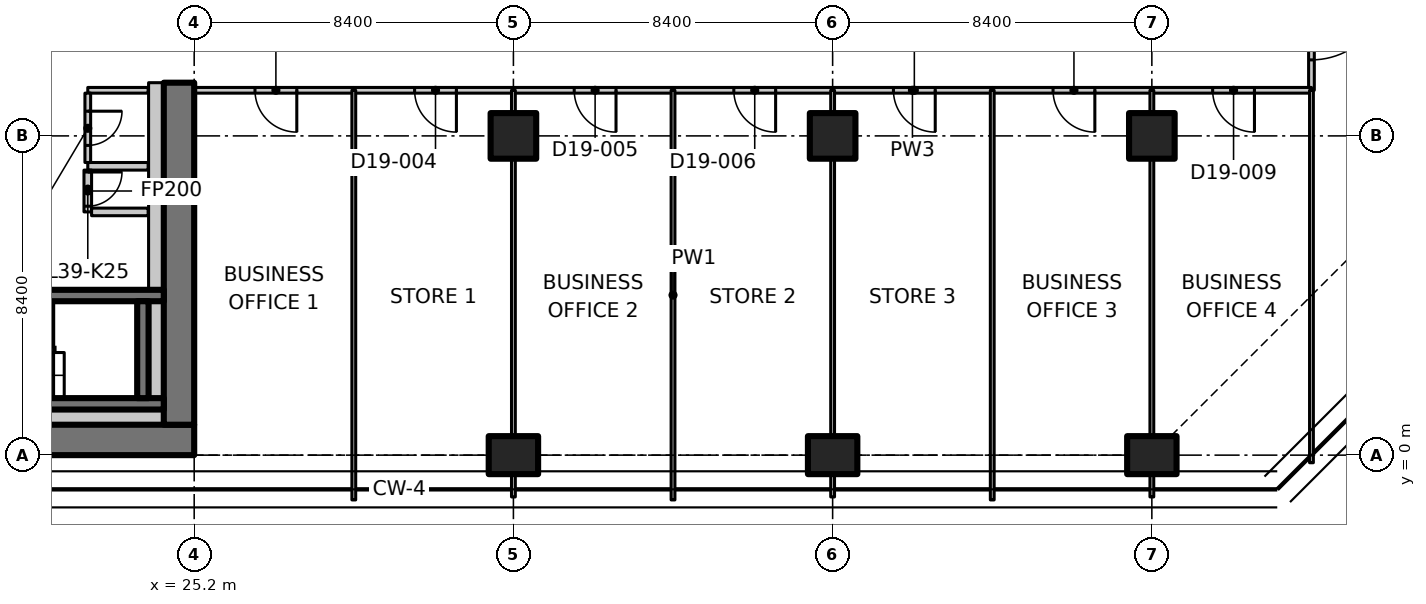
"""IFC4 building model, lengths in metres.
Left out: names, types, materials, properties, quantities, classifications, styles, units other than length and angle.
Written with IfcOpenShell. Run it as: python <this file> out.ifc"""

import sys

from ifc_helpers import new_model, si_unit, direction, frame, frame_2d, origin, origin_2d, place, context, subcontext, project, spatial, polyline, rectangle, outline, extrude, element, fill, save


model = new_model("IFC4")
c1 = context("Model", 3, precision=1e-05, world=origin(), true_north=direction((0.0, 1.0)))
c2 = subcontext(c1, "Body", "Model", "MODEL_VIEW")
j1 = project(units=[si_unit("LENGTHUNIT", "METRE"), si_unit("PLANEANGLEUNIT", "RADIAN")], contexts=[c1])
p1 = place(None, origin())
s1 = spatial("IfcSite", under=j1, at=p1, CompositionType="ELEMENT")
p2 = place(p1, origin())
s2 = spatial("IfcBuilding", under=s1, at=p2, CompositionType="ELEMENT")
p3 = place(p2, frame((0.0, 0.0, 156.5)))
s3 = spatial("IfcBuildingStorey", under=s2, at=p3, CompositionType="ELEMENT", Elevation=156.5)
p4 = place(p3, frame((33.6, 0.0, 0.0), z_axis=(0.0, 0.0, 1.0), x_axis=(0.0, 1.0, 0.0)))
e1 = element("IfcColumn", 1, at=p4, inside=s3, PredefinedType="COLUMN", context=c2, shape_type="SweptSolid", body=[
    extrude(rectangle(XDim=1.0, YDim=1.3, at=origin_2d()), origin(), (0.0, 0.0, 1.0), 5.2),
])
p5 = place(p3, frame((33.6, 8.4, 0.0), z_axis=(0.0, 0.0, 1.0), x_axis=(1.0, 0.0, 0.0)))
e2 = element("IfcColumn", 2, at=p5, inside=s3, PredefinedType="COLUMN", context=c2, shape_type="SweptSolid", body=[
    extrude(rectangle(XDim=1.2, YDim=1.2, at=origin_2d()), origin(), (0.0, 0.0, 1.0), 5.2),
])
p6 = place(p3, frame((42.0, 0.0, 0.0), z_axis=(0.0, 0.0, 1.0), x_axis=(0.0, 1.0, 0.0)))
e3 = element("IfcColumn", 3, at=p6, inside=s3, PredefinedType="COLUMN", context=c2, shape_type="SweptSolid", body=[
    extrude(rectangle(XDim=1.0, YDim=1.3, at=origin_2d()), origin(), (0.0, 0.0, 1.0), 5.2),
])
p7 = place(p3, frame((42.0, 8.4, 0.0), z_axis=(0.0, 0.0, 1.0), x_axis=(1.0, 0.0, 0.0)))
e4 = element("IfcColumn", 4, at=p7, inside=s3, PredefinedType="COLUMN", context=c2, shape_type="SweptSolid", body=[
    extrude(rectangle(XDim=1.2, YDim=1.2, at=origin_2d()), origin(), (0.0, 0.0, 1.0), 5.2),
])
p8 = place(p3, frame((50.4, 0.0, 0.0), z_axis=(0.0, 0.0, 1.0), x_axis=(0.0, 1.0, 0.0)))
e5 = element("IfcColumn", 5, at=p8, inside=s3, PredefinedType="COLUMN", context=c2, shape_type="SweptSolid", body=[
    extrude(rectangle(XDim=1.0, YDim=1.3, at=origin_2d()), origin(), (0.0, 0.0, 1.0), 5.2),
])
p9 = place(p3, frame((50.4, 8.4, 0.0), z_axis=(0.0, 0.0, 1.0), x_axis=(1.0, 0.0, 0.0)))
e6 = element("IfcColumn", 6, at=p9, inside=s3, PredefinedType="COLUMN", context=c2, shape_type="SweptSolid", body=[
    extrude(rectangle(XDim=1.2, YDim=1.2, at=origin_2d()), origin(), (0.0, 0.0, 1.0), 5.2),
])
p10 = place(p3, frame((7.136, 0.4, 0.0), z_axis=(0.0, 0.0, 1.0), x_axis=(1.0, 0.0, 0.0)))
e7 = element("IfcWall", 7, at=p10, inside=s3, PredefinedType="SHEAR", context=c2, shape_type="SweptSolid", body=[
    extrude(rectangle(XDim=18.063, YDim=0.8, at=frame_2d((9.032, 0.0))), origin(), (0.0, 0.0, 1.0), 5.2),
])
p11 = place(p3, frame((24.8, 0.8, 0.0), z_axis=(0.0, 0.0, 1.0), x_axis=(0.0, 1.0, 0.0)))
e8 = element("IfcWall", 8, at=p11, inside=s3, PredefinedType="SHEAR", context=c2, shape_type="SweptSolid", body=[
    extrude(rectangle(XDim=9.0, YDim=0.8, at=frame_2d((4.5, 0.0))), origin(), (0.0, 0.0, 1.0), 5.2),
])
p12 = place(p3, frame((15.8, 1.35, 0.0), z_axis=(0.0, 0.0, 1.0), x_axis=(1.0, 0.0, 0.0)))
e9 = element("IfcWall", 9, at=p12, inside=s3, PredefinedType="SHEAR", context=c2, shape_type="SweptSolid", body=[
    extrude(rectangle(XDim=8.6, YDim=0.3, at=frame_2d((4.3, 0.0))), origin(), (0.0, 0.0, 1.0), 5.2),
])
p13 = place(p3, frame((15.8, 4.2, 0.0), z_axis=(0.0, 0.0, 1.0), x_axis=(1.0, 0.0, 0.0)))
e10 = element("IfcWall", 10, at=p13, inside=s3, PredefinedType="SHEAR", context=c2, shape_type="SweptSolid", body=[
    extrude(rectangle(XDim=8.6, YDim=0.3, at=frame_2d((4.3, 0.0))), origin(), (0.0, 0.0, 1.0), 5.2),
])
p14 = place(p13, frame((0.4, 0.0, 0.0)))
e11 = element("IfcOpeningElement", 11, at=p14, cuts=e10, PredefinedType="OPENING", context=c2, shape_type="SweptSolid", body=[
    extrude(rectangle(XDim=1.0, YDim=2.1, at=frame_2d((0.5, 1.05))), frame((0.0, 0.16, 0.0), z_axis=(0.0, -1.0, 0.0), x_axis=(1.0, 0.0, 0.0)), (0.0, 0.0, 1.0), 0.32),
])
p15 = place(p3, frame((23.85, 1.5, 0.0), z_axis=(0.0, 0.0, 1.0), x_axis=(0.0, 1.0, 0.0)))
e12 = element("IfcWall", 12, at=p15, inside=s3, PredefinedType="SHEAR", context=c2, shape_type="SweptSolid", body=[
    extrude(rectangle(XDim=2.55, YDim=0.3, at=frame_2d((1.275, 0.0))), origin(), (0.0, 0.0, 1.0), 5.2),
])
p16 = place(p3, frame((23.988, 7.6, 0.0), z_axis=(0.0, 0.0, 1.0), x_axis=(-1.0, 0.0, 0.0)))
e13 = element("IfcWall", 13, at=p16, inside=s3, PredefinedType="PARTITIONING", context=c2, shape_type="SweptSolid", body=[
    extrude(rectangle(XDim=1.588, YDim=0.2, at=frame_2d((0.794, 0.0))), origin(), (0.0, 0.0, 1.0), 5.2),
])
p17 = place(p3, frame((22.4, 7.5, 0.0), z_axis=(0.0, 0.0, 1.0), x_axis=(0.0, -1.0, 0.0)))
e14 = element("IfcWall", 14, at=p17, inside=s3, PredefinedType="PARTITIONING", context=c2, shape_type="SweptSolid", body=[
    extrude(rectangle(XDim=1.1, YDim=0.2, at=frame_2d((0.55, 0.0))), origin(), (0.0, 0.0, 1.0), 5.2),
])
p18 = place(p17, frame((0.05, 0.0, 0.0)))
e15 = element("IfcOpeningElement", 15, at=p18, cuts=e14, PredefinedType="OPENING", context=c2, shape_type="SweptSolid", body=[
    extrude(rectangle(XDim=0.9, YDim=2.1, at=frame_2d((0.45, 1.05))), frame((0.0, 0.11, 0.0), z_axis=(0.0, -1.0, 0.0), x_axis=(1.0, 0.0, 0.0)), (0.0, 0.0, 1.0), 0.22),
])
p19 = place(p3, frame((22.5, 6.4, 0.0), z_axis=(0.0, 0.0, 1.0), x_axis=(1.0, 0.0, 0.0)))
e16 = element("IfcWall", 16, at=p19, inside=s3, PredefinedType="PARTITIONING", context=c2, shape_type="SweptSolid", body=[
    extrude(rectangle(XDim=1.488, YDim=0.2, at=frame_2d((0.744, 0.0))), origin(), (0.0, 0.0, 1.0), 5.2),
])
p20 = place(p3, frame((23.988, 9.6, 0.0), z_axis=(0.0, 0.0, 1.0), x_axis=(-1.0, 0.0, 0.0)))
e17 = element("IfcWall", 17, at=p20, inside=s3, PredefinedType="PARTITIONING", context=c2, shape_type="SweptSolid", body=[
    extrude(rectangle(XDim=1.588, YDim=0.15, at=frame_2d((0.794, 0.0))), origin(), (0.0, 0.0, 1.0), 5.2),
])
p21 = place(p3, frame((22.4, 9.525, 0.0), z_axis=(0.0, 0.0, 1.0), x_axis=(0.0, -1.0, 0.0)))
e18 = element("IfcWall", 18, at=p21, inside=s3, PredefinedType="PARTITIONING", context=c2, shape_type="SweptSolid", body=[
    extrude(rectangle(XDim=1.825, YDim=0.15, at=frame_2d((0.913, 0.0))), origin(), (0.0, 0.0, 1.0), 5.2),
])
p22 = place(p21, frame((0.475, 0.0, 0.0)))
e19 = element("IfcOpeningElement", 19, at=p22, cuts=e18, PredefinedType="OPENING", context=c2, shape_type="SweptSolid", body=[
    extrude(rectangle(XDim=0.9, YDim=2.1, at=frame_2d((0.45, 1.05))), frame((0.0, 0.085, 0.0), z_axis=(0.0, -1.0, 0.0), x_axis=(1.0, 0.0, 0.0)), (0.0, 0.0, 1.0), 0.17),
])
p23 = place(p3, frame((13.35, 1.0, 0.0), z_axis=(0.0, 0.0, 1.0), x_axis=(1.0, 0.0, 0.0)))
e20 = element("IfcWall", 20, at=p23, inside=s3, PredefinedType="PARTITIONING", context=c2, shape_type="SweptSolid", body=[
    extrude(rectangle(XDim=11.05, YDim=0.4, at=frame_2d((5.525, 0.0))), origin(), (0.0, 0.0, 1.0), 5.2),
])
p24 = place(p3, frame((24.2, 1.5, 0.0), z_axis=(0.0, 0.0, 1.0), x_axis=(0.0, 1.0, 0.0)))
e21 = element("IfcWall", 21, at=p24, inside=s3, PredefinedType="PARTITIONING", context=c2, shape_type="SweptSolid", body=[
    extrude(rectangle(XDim=2.55, YDim=0.4, at=frame_2d((1.275, 0.0))), origin(), (0.0, 0.0, 1.0), 5.2),
])
p25 = place(p3, frame((24.2, 4.35, 0.0), z_axis=(0.0, 0.0, 1.0), x_axis=(0.0, 1.0, 0.0)))
e22 = element("IfcWall", 22, at=p25, inside=s3, PredefinedType="PARTITIONING", context=c2, shape_type="SweptSolid", body=[
    extrude(rectangle(XDim=5.45, YDim=0.4, at=frame_2d((2.725, 0.0))), origin(), (0.0, 0.0, 1.0), 5.2),
])
p26 = place(p3, frame((29.4, 9.6, 0.0), z_axis=(0.0, 0.0, 1.0), x_axis=(-1.0, 0.0, 0.0)))
e23 = element("IfcWall", 23, at=p26, inside=s3, PredefinedType="PARTITIONING", context=c2, shape_type="SweptSolid", body=[
    extrude(rectangle(XDim=4.2, YDim=0.15, at=frame_2d((2.1, 0.0))), origin(), (0.0, 0.0, 1.0), 5.18),
])
p27 = place(p26, frame((1.5, 0.0, 0.0)))
e24 = element("IfcOpeningElement", 24, at=p27, cuts=e23, PredefinedType="OPENING", context=c2, shape_type="SweptSolid", body=[
    extrude(rectangle(XDim=1.1, YDim=2.1, at=frame_2d((0.55, 1.05))), frame((0.0, 0.085, 0.0), z_axis=(0.0, -1.0, 0.0), x_axis=(1.0, 0.0, 0.0)), (0.0, 0.0, 1.0), 0.17),
])
p28 = place(p3, frame((54.6, 13.0, 0.0), z_axis=(0.0, 0.0, 1.0), x_axis=(0.0, -1.0, 0.0)))
e25 = element("IfcWall", 25, at=p28, inside=s3, PredefinedType="PARTITIONING", context=c2, shape_type="SweptSolid", body=[
    extrude(rectangle(XDim=3.4, YDim=0.15, at=frame_2d((1.7, 0.0))), origin(), (0.0, 0.0, 1.0), 5.18),
])
p29 = place(p28, frame((0.6, 0.0, 0.0)))
e26 = element("IfcOpeningElement", 26, at=p29, cuts=e25, PredefinedType="OPENING", context=c2, shape_type="SweptSolid", body=[
    extrude(rectangle(XDim=2.0, YDim=2.4, at=frame_2d((1.0, 1.2))), frame((0.0, 0.085, 0.0), z_axis=(0.0, -1.0, 0.0), x_axis=(1.0, 0.0, 0.0)), (0.0, 0.0, 1.0), 0.17),
])
p30 = place(p3, frame((33.6, 9.6, 0.0), z_axis=(0.0, 0.0, 1.0), x_axis=(-1.0, 0.0, 0.0)))
e27 = element("IfcWall", 27, at=p30, inside=s3, PredefinedType="PARTITIONING", context=c2, shape_type="SweptSolid", body=[
    extrude(rectangle(XDim=4.2, YDim=0.15, at=frame_2d((2.1, 0.0))), origin(), (0.0, 0.0, 1.0), 5.18),
])
p31 = place(p30, frame((1.5, 0.0, 0.0)))
e28 = element("IfcOpeningElement", 28, at=p31, cuts=e27, PredefinedType="OPENING", context=c2, shape_type="SweptSolid", body=[
    extrude(rectangle(XDim=1.1, YDim=2.1, at=frame_2d((0.55, 1.05))), frame((0.0, 0.085, 0.0), z_axis=(0.0, -1.0, 0.0), x_axis=(1.0, 0.0, 0.0)), (0.0, 0.0, 1.0), 0.17),
])
p32 = place(p3, frame((37.8, 9.6, 0.0), z_axis=(0.0, 0.0, 1.0), x_axis=(-1.0, 0.0, 0.0)))
e29 = element("IfcWall", 29, at=p32, inside=s3, PredefinedType="PARTITIONING", context=c2, shape_type="SweptSolid", body=[
    extrude(rectangle(XDim=4.2, YDim=0.15, at=frame_2d((2.1, 0.0))), origin(), (0.0, 0.0, 1.0), 5.18),
])
p33 = place(p32, frame((1.5, 0.0, 0.0)))
e30 = element("IfcOpeningElement", 30, at=p33, cuts=e29, PredefinedType="OPENING", context=c2, shape_type="SweptSolid", body=[
    extrude(rectangle(XDim=1.1, YDim=2.1, at=frame_2d((0.55, 1.05))), frame((0.0, 0.085, 0.0), z_axis=(0.0, -1.0, 0.0), x_axis=(1.0, 0.0, 0.0)), (0.0, 0.0, 1.0), 0.17),
])
p34 = place(p3, frame((42.0, 9.6, 0.0), z_axis=(0.0, 0.0, 1.0), x_axis=(-1.0, 0.0, 0.0)))
e31 = element("IfcWall", 31, at=p34, inside=s3, PredefinedType="PARTITIONING", context=c2, shape_type="SweptSolid", body=[
    extrude(rectangle(XDim=4.2, YDim=0.15, at=frame_2d((2.1, 0.0))), origin(), (0.0, 0.0, 1.0), 5.18),
])
p35 = place(p34, frame((1.5, 0.0, 0.0)))
e32 = element("IfcOpeningElement", 32, at=p35, cuts=e31, PredefinedType="OPENING", context=c2, shape_type="SweptSolid", body=[
    extrude(rectangle(XDim=1.1, YDim=2.1, at=frame_2d((0.55, 1.05))), frame((0.0, 0.085, 0.0), z_axis=(0.0, -1.0, 0.0), x_axis=(1.0, 0.0, 0.0)), (0.0, 0.0, 1.0), 0.17),
])
p36 = place(p3, frame((46.2, 9.6, 0.0), z_axis=(0.0, 0.0, 1.0), x_axis=(-1.0, 0.0, 0.0)))
e33 = element("IfcWall", 33, at=p36, inside=s3, PredefinedType="PARTITIONING", context=c2, shape_type="SweptSolid", body=[
    extrude(rectangle(XDim=4.2, YDim=0.15, at=frame_2d((2.1, 0.0))), origin(), (0.0, 0.0, 1.0), 5.18),
])
p37 = place(p36, frame((1.5, 0.0, 0.0)))
e34 = element("IfcOpeningElement", 34, at=p37, cuts=e33, PredefinedType="OPENING", context=c2, shape_type="SweptSolid", body=[
    extrude(rectangle(XDim=1.1, YDim=2.1, at=frame_2d((0.55, 1.05))), frame((0.0, 0.085, 0.0), z_axis=(0.0, -1.0, 0.0), x_axis=(1.0, 0.0, 0.0)), (0.0, 0.0, 1.0), 0.17),
])
p38 = place(p3, frame((50.4, 9.6, 0.0), z_axis=(0.0, 0.0, 1.0), x_axis=(-1.0, 0.0, 0.0)))
e35 = element("IfcWall", 35, at=p38, inside=s3, PredefinedType="PARTITIONING", context=c2, shape_type="SweptSolid", body=[
    extrude(rectangle(XDim=4.2, YDim=0.15, at=frame_2d((2.1, 0.0))), origin(), (0.0, 0.0, 1.0), 5.18),
])
p39 = place(p38, frame((1.5, 0.0, 0.0)))
e36 = element("IfcOpeningElement", 36, at=p39, cuts=e35, PredefinedType="OPENING", context=c2, shape_type="SweptSolid", body=[
    extrude(rectangle(XDim=1.1, YDim=2.1, at=frame_2d((0.55, 1.05))), frame((0.0, 0.085, 0.0), z_axis=(0.0, -1.0, 0.0), x_axis=(1.0, 0.0, 0.0)), (0.0, 0.0, 1.0), 0.17),
])
p40 = place(p3, frame((54.6, 9.6, 0.0), z_axis=(0.0, 0.0, 1.0), x_axis=(-1.0, 0.0, 0.0)))
e37 = element("IfcWall", 37, at=p40, inside=s3, PredefinedType="PARTITIONING", context=c2, shape_type="SweptSolid", body=[
    extrude(rectangle(XDim=4.2, YDim=0.15, at=frame_2d((2.1, 0.0))), origin(), (0.0, 0.0, 1.0), 5.18),
])
p41 = place(p40, frame((1.5, 0.0, 0.0)))
e38 = element("IfcOpeningElement", 38, at=p41, cuts=e37, PredefinedType="OPENING", context=c2, shape_type="SweptSolid", body=[
    extrude(rectangle(XDim=1.1, YDim=2.1, at=frame_2d((0.55, 1.05))), frame((0.0, 0.085, 0.0), z_axis=(0.0, -1.0, 0.0), x_axis=(1.0, 0.0, 0.0)), (0.0, 0.0, 1.0), 0.17),
])
p42 = place(p3, frame((54.6, -0.2, 0.0), z_axis=(0.0, 0.0, 1.0), x_axis=(0.0, 1.0, 0.0)))
e39 = element("IfcWall", 39, at=p42, inside=s3, PredefinedType="PARTITIONING", context=c2, shape_type="SweptSolid", body=[
    extrude(outline(polyline([(0.0, 0.0), (9.8, 0.0), (9.8, 5.18), (5.066, 5.18), (5.064, 4.83), (3.736, 4.83), (3.734, 5.18), (0.0, 5.18), (0.0, 0.0)])), frame((0.0, 0.05, 0.0), z_axis=(0.0, -1.0, 0.0), x_axis=(1.0, 0.0, 0.0)), (0.0, 0.0, 1.0), 0.1),
])
p43 = place(p3, frame((29.4, 9.6, 0.0), z_axis=(0.0, 0.0, 1.0), x_axis=(0.0, -1.0, 0.0)))
e40 = element("IfcWall", 40, at=p43, inside=s3, PredefinedType="PARTITIONING", context=c2, shape_type="SweptSolid", body=[
    extrude(outline(polyline([(0.0, 0.0), (10.779, 0.0), (10.779, 5.18), (10.7, 5.18), (10.05, 5.18), (10.048, 4.83), (9.152, 4.83), (9.15, 5.18), (0.0, 5.18), (0.0, 0.0)])), frame((0.0, 0.05, 0.0), z_axis=(0.0, -1.0, 0.0), x_axis=(1.0, 0.0, 0.0)), (0.0, 0.0, 1.0), 0.1),
])
p44 = place(p3, frame((33.6, 9.6, 0.0), z_axis=(0.0, 0.0, 1.0), x_axis=(0.0, -1.0, 0.0)))
e41 = element("IfcWall", 41, at=p44, inside=s3, PredefinedType="PARTITIONING", context=c2, shape_type="SweptSolid", body=[
    extrude(rectangle(XDim=0.58, YDim=0.1, at=frame_2d((0.29, 0.0))), origin(), (0.0, 0.0, 1.0), 5.18),
])
p45 = place(p3, frame((33.6, 7.78, 0.0), z_axis=(0.0, 0.0, 1.0), x_axis=(0.0, -1.0, 0.0)))
e42 = element("IfcWall", 42, at=p45, inside=s3, PredefinedType="PARTITIONING", context=c2, shape_type="SweptSolid", body=[
    extrude(rectangle(XDim=7.26, YDim=0.1, at=frame_2d((3.63, 0.0))), origin(), (0.0, 0.0, 1.0), 5.18),
])
p46 = place(p3, frame((33.6, -0.52, 0.0), z_axis=(0.0, 0.0, 1.0), x_axis=(0.0, -1.0, 0.0)))
e43 = element("IfcWall", 43, at=p46, inside=s3, PredefinedType="PARTITIONING", context=c2, shape_type="SweptSolid", body=[
    extrude(rectangle(XDim=0.58, YDim=0.1, at=frame_2d((0.29, 0.0))), origin(), (0.0, 0.0, 1.0), 5.18),
])
p47 = place(p3, frame((37.8, 9.6, 0.0), z_axis=(0.0, 0.0, 1.0), x_axis=(0.0, -1.0, 0.0)))
e44 = element("IfcWall", 44, at=p47, inside=s3, PredefinedType="PARTITIONING", context=c2, shape_type="SweptSolid", body=[
    extrude(outline(polyline([(0.0, 0.0), (10.779, 0.0), (10.779, 5.18), (10.7, 5.18), (10.05, 5.18), (10.048, 4.83), (9.152, 4.83), (9.15, 5.18), (0.0, 5.18), (0.0, 0.0)])), frame((0.0, 0.05, 0.0), z_axis=(0.0, -1.0, 0.0), x_axis=(1.0, 0.0, 0.0)), (0.0, 0.0, 1.0), 0.1),
])
p48 = place(p3, frame((42.0, 9.6, 0.0), z_axis=(0.0, 0.0, 1.0), x_axis=(0.0, -1.0, 0.0)))
e45 = element("IfcWall", 45, at=p48, inside=s3, PredefinedType="PARTITIONING", context=c2, shape_type="SweptSolid", body=[
    extrude(rectangle(XDim=0.58, YDim=0.1, at=frame_2d((0.29, 0.0))), origin(), (0.0, 0.0, 1.0), 5.18),
])
p49 = place(p3, frame((42.0, 7.78, 0.0), z_axis=(0.0, 0.0, 1.0), x_axis=(0.0, -1.0, 0.0)))
e46 = element("IfcWall", 46, at=p49, inside=s3, PredefinedType="PARTITIONING", context=c2, shape_type="SweptSolid", body=[
    extrude(rectangle(XDim=7.26, YDim=0.1, at=frame_2d((3.63, 0.0))), origin(), (0.0, 0.0, 1.0), 5.18),
])
p50 = place(p3, frame((42.0, -0.52, 0.0), z_axis=(0.0, 0.0, 1.0), x_axis=(0.0, -1.0, 0.0)))
e47 = element("IfcWall", 47, at=p50, inside=s3, PredefinedType="PARTITIONING", context=c2, shape_type="SweptSolid", body=[
    extrude(rectangle(XDim=0.58, YDim=0.1, at=frame_2d((0.29, 0.0))), origin(), (0.0, 0.0, 1.0), 5.18),
])
p51 = place(p3, frame((46.2, 9.6, 0.0), z_axis=(0.0, 0.0, 1.0), x_axis=(0.0, -1.0, 0.0)))
e48 = element("IfcWall", 48, at=p51, inside=s3, PredefinedType="PARTITIONING", context=c2, shape_type="SweptSolid", body=[
    extrude(outline(polyline([(0.0, 0.0), (10.779, 0.0), (10.779, 5.18), (10.7, 5.18), (10.05, 5.18), (10.048, 4.83), (9.152, 4.83), (9.15, 5.18), (0.0, 5.18), (0.0, 0.0)])), frame((0.0, 0.05, 0.0), z_axis=(0.0, -1.0, 0.0), x_axis=(1.0, 0.0, 0.0)), (0.0, 0.0, 1.0), 0.1),
])
p52 = place(p3, frame((50.4, 9.6, 0.0), z_axis=(0.0, 0.0, 1.0), x_axis=(0.0, -1.0, 0.0)))
e49 = element("IfcWall", 49, at=p52, inside=s3, PredefinedType="PARTITIONING", context=c2, shape_type="SweptSolid", body=[
    extrude(rectangle(XDim=0.58, YDim=0.1, at=frame_2d((0.29, 0.0))), origin(), (0.0, 0.0, 1.0), 5.18),
])
p53 = place(p3, frame((50.4, 7.78, 0.0), z_axis=(0.0, 0.0, 1.0), x_axis=(0.0, -1.0, 0.0)))
e50 = element("IfcWall", 50, at=p53, inside=s3, PredefinedType="PARTITIONING", context=c2, shape_type="SweptSolid", body=[
    extrude(outline(polyline([(0.0, 0.0), (7.26, 0.0), (7.26, 4.83), (7.116, 4.83), (7.114, 5.18), (0.0, 5.18), (0.0, 0.0)])), frame((0.0, 0.05, 0.0), z_axis=(0.0, -1.0, 0.0), x_axis=(1.0, 0.0, 0.0)), (0.0, 0.0, 1.0), 0.1),
])
p54 = place(p3, frame((50.4, -0.52, 0.0), z_axis=(0.0, 0.0, 1.0), x_axis=(0.0, -1.0, 0.0)))
e51 = element("IfcWall", 51, at=p54, inside=s3, PredefinedType="PARTITIONING", context=c2, shape_type="SweptSolid", body=[
    extrude(rectangle(XDim=0.58, YDim=0.1, at=frame_2d((0.29, 0.0))), origin(), (0.0, 0.0, 1.0), 5.18),
])
p55 = place(p18, origin())
e52 = element("IfcDoor", 52, at=p55, inside=s3, OperationType="SINGLE_SWING_LEFT", PredefinedType="DOOR", context=c2, shape_type="SweptSolid", body=[
    extrude(rectangle(XDim=0.9, YDim=2.1, at=frame_2d((0.45, 1.05))), frame((0.0, 0.025, 0.0), z_axis=(0.0, -1.0, 0.0), x_axis=(1.0, 0.0, 0.0)), (0.0, 0.0, 1.0), 0.05),
])
fill(e15, e52)
p56 = place(p22, origin())
e53 = element("IfcDoor", 53, at=p56, inside=s3, OperationType="SINGLE_SWING_RIGHT", PredefinedType="DOOR", context=c2, shape_type="SweptSolid", body=[
    extrude(rectangle(XDim=0.9, YDim=2.1, at=frame_2d((0.45, 1.05))), frame((0.0, 0.025, 0.0), z_axis=(0.0, -1.0, 0.0), x_axis=(1.0, 0.0, 0.0)), (0.0, 0.0, 1.0), 0.05),
])
fill(e19, e53)
p57 = place(p29, origin())
e54 = element("IfcDoor", 54, at=p57, inside=s3, OperationType="DOUBLE_DOOR_SINGLE_SWING", PredefinedType="DOOR", context=c2, shape_type="SweptSolid", body=[
    extrude(rectangle(XDim=2.0, YDim=2.4, at=frame_2d((1.0, 1.2))), frame((0.0, 0.025, 0.0), z_axis=(0.0, -1.0, 0.0), x_axis=(1.0, 0.0, 0.0)), (0.0, 0.0, 1.0), 0.05),
])
fill(e26, e54)
p58 = place(p27, origin())
e55 = element("IfcDoor", 55, at=p58, inside=s3, OperationType="SINGLE_SWING_LEFT", PredefinedType="DOOR", context=c2, shape_type="SweptSolid", body=[
    extrude(rectangle(XDim=1.1, YDim=2.1, at=frame_2d((0.55, 1.05))), frame((0.0, 0.025, 0.0), z_axis=(0.0, -1.0, 0.0), x_axis=(1.0, 0.0, 0.0)), (0.0, 0.0, 1.0), 0.05),
])
fill(e24, e55)
p59 = place(p31, origin())
e56 = element("IfcDoor", 56, at=p59, inside=s3, OperationType="SINGLE_SWING_LEFT", PredefinedType="DOOR", context=c2, shape_type="SweptSolid", body=[
    extrude(rectangle(XDim=1.1, YDim=2.1, at=frame_2d((0.55, 1.05))), frame((0.0, 0.025, 0.0), z_axis=(0.0, -1.0, 0.0), x_axis=(1.0, 0.0, 0.0)), (0.0, 0.0, 1.0), 0.05),
])
fill(e28, e56)
p60 = place(p33, origin())
e57 = element("IfcDoor", 57, at=p60, inside=s3, OperationType="SINGLE_SWING_LEFT", PredefinedType="DOOR", context=c2, shape_type="SweptSolid", body=[
    extrude(rectangle(XDim=1.1, YDim=2.1, at=frame_2d((0.55, 1.05))), frame((0.0, 0.025, 0.0), z_axis=(0.0, -1.0, 0.0), x_axis=(1.0, 0.0, 0.0)), (0.0, 0.0, 1.0), 0.05),
])
fill(e30, e57)
p61 = place(p35, origin())
e58 = element("IfcDoor", 58, at=p61, inside=s3, OperationType="SINGLE_SWING_LEFT", PredefinedType="DOOR", context=c2, shape_type="SweptSolid", body=[
    extrude(rectangle(XDim=1.1, YDim=2.1, at=frame_2d((0.55, 1.05))), frame((0.0, 0.025, 0.0), z_axis=(0.0, -1.0, 0.0), x_axis=(1.0, 0.0, 0.0)), (0.0, 0.0, 1.0), 0.05),
])
fill(e32, e58)
p62 = place(p37, origin())
e59 = element("IfcDoor", 59, at=p62, inside=s3, OperationType="SINGLE_SWING_LEFT", PredefinedType="DOOR", context=c2, shape_type="SweptSolid", body=[
    extrude(rectangle(XDim=1.1, YDim=2.1, at=frame_2d((0.55, 1.05))), frame((0.0, 0.025, 0.0), z_axis=(0.0, -1.0, 0.0), x_axis=(1.0, 0.0, 0.0)), (0.0, 0.0, 1.0), 0.05),
])
fill(e34, e59)
p63 = place(p39, origin())
e60 = element("IfcDoor", 60, at=p63, inside=s3, OperationType="SINGLE_SWING_LEFT", PredefinedType="DOOR", context=c2, shape_type="SweptSolid", body=[
    extrude(rectangle(XDim=1.1, YDim=2.1, at=frame_2d((0.55, 1.05))), frame((0.0, 0.025, 0.0), z_axis=(0.0, -1.0, 0.0), x_axis=(1.0, 0.0, 0.0)), (0.0, 0.0, 1.0), 0.05),
])
fill(e36, e60)
p64 = place(p41, origin())
e61 = element("IfcDoor", 61, at=p64, inside=s3, OperationType="SINGLE_SWING_LEFT", PredefinedType="DOOR", context=c2, shape_type="SweptSolid", body=[
    extrude(rectangle(XDim=1.1, YDim=2.1, at=frame_2d((0.55, 1.05))), frame((0.0, 0.025, 0.0), z_axis=(0.0, -1.0, 0.0), x_axis=(1.0, 0.0, 0.0)), (0.0, 0.0, 1.0), 0.05),
])
fill(e38, e61)
save(model, sys.argv[1])
